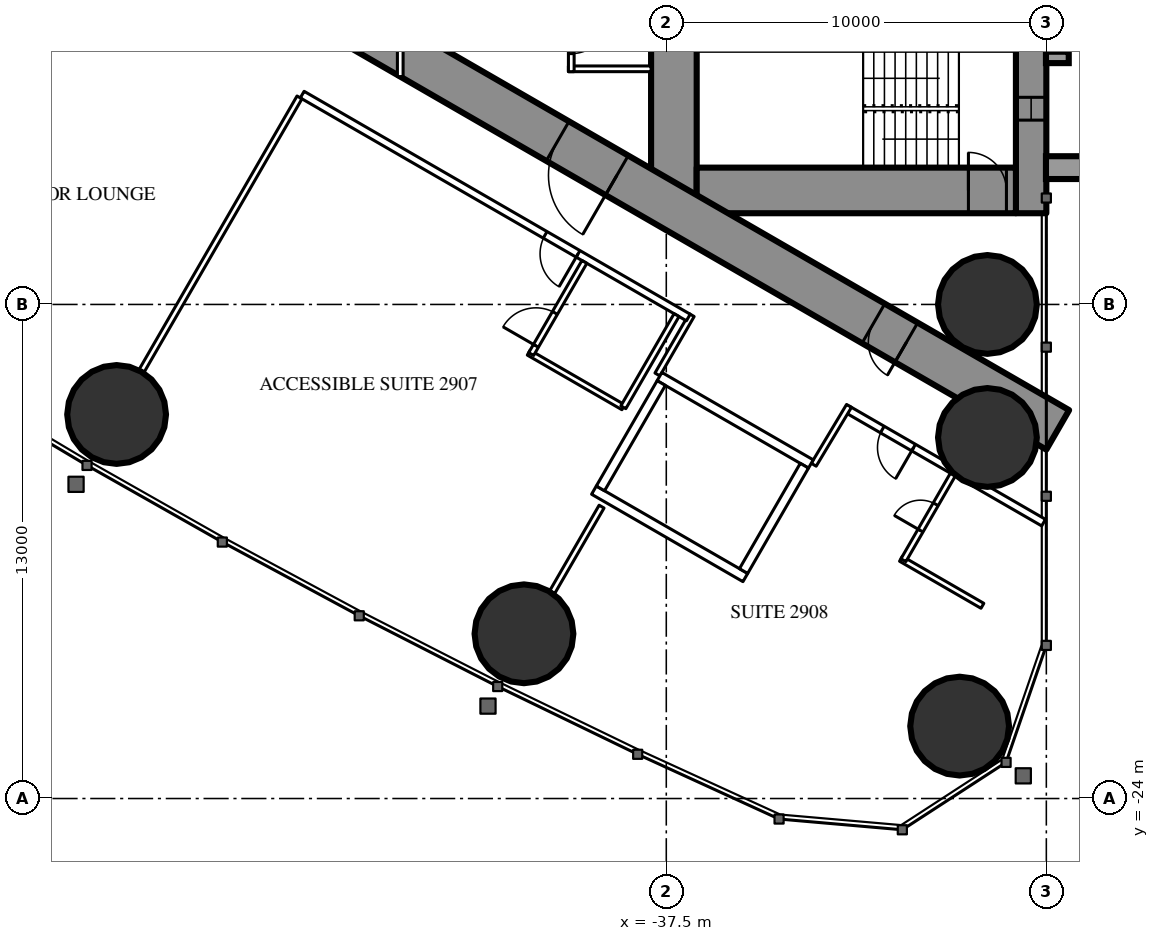
"""IFC4 building model, lengths in metres.
Left out: names, types, materials, properties, quantities, classifications, styles, units other than length and angle.
Written with IfcOpenShell. Run it as: python <this file> out.ifc"""

import sys

from ifc_helpers import new_model, si_unit, direction, frame, frame_2d, origin, origin_2d, place, context, subcontext, project, spatial, rectangle, hollow_circle, extrude, element, fill, save


model = new_model("IFC4")
c1 = context("Model", 3, precision=1e-05, world=origin(), true_north=direction((0.0, 1.0)))
c2 = subcontext(c1, "Body", "Model", "MODEL_VIEW")
j1 = project(units=[si_unit("LENGTHUNIT", "METRE"), si_unit("PLANEANGLEUNIT", "RADIAN")], contexts=[c1])
p1 = place(None, origin())
s1 = spatial("IfcSite", under=j1, at=p1, CompositionType="ELEMENT")
p2 = place(p1, origin())
s2 = spatial("IfcBuilding", under=s1, at=p2, CompositionType="ELEMENT")
p3 = place(p2, frame((0.0, 0.0, 111.6)))
s3 = spatial("IfcBuildingStorey", under=s2, at=p3, CompositionType="ELEMENT", Elevation=111.6)
for number, where, z_axis, x_axis in (
    (1, (-29.781, -22.095, 0.0), (0.0, 0.0, 1.0), (1.0, 0.0, 0.0)),
    (2, (-29.05, -11.0, 0.0), (0.0, 0.0, 1.0), (1.0, 0.0, 0.0)),
    (3, (-29.05, -14.5, 0.0), (0.0, 0.0, 1.0), (1.0, 0.0, 0.0)),
    (4, (-51.963, -13.895, 0.0), (0.0, 0.0, 1.0), (1.0, 0.0, 0.0)),
    (5, (-41.245, -19.666, 0.0), (0.0, 0.0, 1.0), (1.0, 0.0, 0.0)),
):
    element("IfcColumn", number, at=place(p3, frame(where, z_axis=z_axis, x_axis=x_axis)), inside=s3, PredefinedType="COLUMN", context=c2, shape_type="SweptSolid", body=[
        extrude(hollow_circle(Radius=1.3, WallThickness=0.1, at=origin_2d()), origin(), (0.0, 0.0, 1.0), 3.5),
    ])
p4 = place(p3, frame((-27.9, 8.6, 0.0), z_axis=(0.0, 0.0, 1.0), x_axis=(0.0, -1.0, 0.0)))
e6 = element("IfcWall", 6, at=p4, inside=s3, PredefinedType="SHEAR", context=c2, shape_type="SweptSolid", body=[
    extrude(rectangle(XDim=17.2, YDim=0.8, at=frame_2d((8.6, 0.0))), origin(), (0.0, 0.0, 1.0), 3.5),
])
p5 = place(p4, frame((2.45, 0.0, 0.6)))
e7 = element("IfcOpeningElement", 7, at=p5, cuts=e6, PredefinedType="OPENING", context=c2, shape_type="SweptSolid", body=[
    extrude(rectangle(XDim=0.6, YDim=2.1, at=frame_2d((0.3, 1.05))), frame((0.0, 0.41, 0.0), z_axis=(0.0, -1.0, 0.0), x_axis=(1.0, 0.0, 0.0)), (0.0, 0.0, 1.0), 0.82),
])
p6 = place(p4, frame((14.15, 0.0, 0.6)))
e8 = element("IfcOpeningElement", 8, at=p6, cuts=e6, PredefinedType="OPENING", context=c2, shape_type="SweptSolid", body=[
    extrude(rectangle(XDim=0.6, YDim=2.1, at=frame_2d((0.3, 1.05))), frame((0.0, 0.41, 0.0), z_axis=(0.0, -1.0, 0.0), x_axis=(1.0, 0.0, 0.0)), (0.0, 0.0, 1.0), 0.82),
])
p7 = place(p3, frame((-37.3, 8.6, 0.0), z_axis=(0.0, 0.0, 1.0), x_axis=(0.0, -1.0, 0.0)))
e9 = element("IfcWall", 9, at=p7, inside=s3, PredefinedType="SHEAR", context=c2, shape_type="SweptSolid", body=[
    extrude(rectangle(XDim=17.2, YDim=1.2, at=frame_2d((8.6, 0.0))), origin(), (0.0, 0.0, 1.0), 3.5),
])
p8 = place(p7, frame((7.7, 0.0, 0.0)))
e10 = element("IfcOpeningElement", 10, at=p8, cuts=e9, PredefinedType="OPENING", context=c2, shape_type="SweptSolid", body=[
    extrude(rectangle(XDim=1.8, YDim=2.2, at=frame_2d((0.9, 1.1))), frame((0.0, 0.61, 0.0), z_axis=(0.0, -1.0, 0.0), x_axis=(1.0, 0.0, 0.0)), (0.0, 0.0, 1.0), 1.22),
])
p9 = place(p3, frame((-28.3, -8.0, 0.0), z_axis=(0.0, 0.0, 1.0), x_axis=(-1.0, 0.0, 0.0)))
e11 = element("IfcWall", 11, at=p9, inside=s3, PredefinedType="SHEAR", context=c2, shape_type="SweptSolid", body=[
    extrude(rectangle(XDim=8.4, YDim=1.2, at=frame_2d((4.2, 0.0))), origin(), (0.0, 0.0, 1.0), 3.5),
])
p10 = place(p9, frame((0.25, 0.0, 0.0)))
e12 = element("IfcOpeningElement", 12, at=p10, cuts=e11, PredefinedType="OPENING", context=c2, shape_type="SweptSolid", body=[
    extrude(rectangle(XDim=1.0, YDim=2.2, at=frame_2d((0.5, 1.1))), frame((0.0, 0.61, 0.0), z_axis=(0.0, -1.0, 0.0), x_axis=(1.0, 0.0, 0.0)), (0.0, 0.0, 1.0), 1.22),
])
p11 = place(p3, frame((-27.2, -14.3, 0.0), z_axis=(0.0, 0.0, 1.0), x_axis=(-0.866024021859, 0.500002393557, 0.0)))
e13 = element("IfcWall", 13, at=p11, inside=s3, PredefinedType="SHEAR", context=c2, shape_type="SweptSolid", body=[
    extrude(rectangle(XDim=27.907, YDim=1.2, at=frame_2d((13.954, 0.0))), origin(), (0.0, 0.0, 1.0), 3.5),
])
p12 = place(p11, frame((4.6, 0.0, 0.0)))
e14 = element("IfcOpeningElement", 14, at=p12, cuts=e13, PredefinedType="OPENING", context=c2, shape_type="SweptSolid", body=[
    extrude(rectangle(XDim=1.0, YDim=2.2, at=frame_2d((0.5, 1.1))), frame((0.0, 0.61, 0.0), z_axis=(0.0, -1.0, 0.0), x_axis=(1.0, 0.0, 0.0)), (0.0, 0.0, 1.0), 1.22),
])
p13 = place(p11, frame((13.395, 0.0, 0.0)))
e15 = element("IfcOpeningElement", 15, at=p13, cuts=e13, PredefinedType="OPENING", context=c2, shape_type="SweptSolid", body=[
    extrude(rectangle(XDim=1.8, YDim=2.2, at=frame_2d((0.9, 1.1))), frame((0.0, 0.61, 0.0), z_axis=(0.0, -1.0, 0.0), x_axis=(1.0, 0.0, 0.0)), (0.0, 0.0, 1.0), 1.22),
])
p14 = place(p3, frame((-47.151, -5.552, 0.0), z_axis=(0.0, 0.0, 1.0), x_axis=(-0.500003012045, -0.866023664773, 0.0)))
e16 = element("IfcWall", 16, at=p14, inside=s3, PredefinedType="PARTITIONING", context=c2, shape_type="SweptSolid", body=[
    extrude(rectangle(XDim=8.311, YDim=0.15, at=frame_2d((4.156, 0.0))), origin(), (0.0, 0.0, 1.0), 2.2),
])
p15 = place(p3, frame((-39.202, -16.32, 0.0), z_axis=(0.0, 0.0, 1.0), x_axis=(-0.49997716683, -0.86603858612, 0.0)))
e17 = element("IfcWall", 17, at=p15, inside=s3, PredefinedType="PARTITIONING", context=c2, shape_type="SweptSolid", body=[
    extrude(rectangle(XDim=2.6, YDim=0.15, at=frame_2d((1.3, 0.0))), origin(), (0.0, 0.0, 1.0), 3.25),
])
p16 = place(p3, frame((-27.572, -16.741, 0.0), z_axis=(0.0, 0.0, 1.0), x_axis=(-0.866024464444, 0.500001626982, 0.0)))
e18 = element("IfcWall", 18, at=p16, inside=s3, PredefinedType="PARTITIONING", context=c2, shape_type="SweptSolid", body=[
    extrude(rectangle(XDim=5.955, YDim=0.2, at=frame_2d((2.978, 0.0))), origin(), (0.0, 0.0, 1.0), 3.25),
])
p17 = place(p16, frame((3.95, 0.0, 0.0)))
e19 = element("IfcOpeningElement", 19, at=p17, cuts=e18, PredefinedType="OPENING", context=c2, shape_type="SweptSolid", body=[
    extrude(rectangle(XDim=0.95, YDim=2.2, at=frame_2d((0.475, 1.1))), frame((0.0, 0.11, 0.0), z_axis=(0.0, -1.0, 0.0), x_axis=(1.0, 0.0, 0.0)), (0.0, 0.0, 1.0), 0.22),
])
p18 = place(p3, frame((-36.831, -11.28, 0.0), z_axis=(0.0, 0.0, 1.0), x_axis=(-0.499937177781, -0.866061671171, 0.0)))
e20 = element("IfcWall", 20, at=p18, inside=s3, PredefinedType="PARTITIONING", context=c2, shape_type="SweptSolid", body=[
    extrude(rectangle(XDim=1.804, YDim=0.15, at=frame_2d((0.902, 0.0))), origin(), (0.0, 0.0, 1.0), 3.25),
])
p19 = place(p3, frame((-33.621, -15.218, 0.0), z_axis=(0.0, 0.0, 1.0), x_axis=(0.514336634837, 0.857588377991, 0.0)))
e21 = element("IfcWall", 21, at=p19, inside=s3, PredefinedType="PARTITIONING", context=c2, shape_type="SweptSolid", body=[
    extrude(rectangle(XDim=1.805, YDim=0.15, at=frame_2d((0.903, 0.0))), origin(), (0.0, 0.0, 1.0), 3.25),
])
p20 = place(p3, frame((-36.92, -11.344, 0.0), z_axis=(0.0, 0.0, 1.0), x_axis=(-0.866027897759, 0.499995680284, 0.0)))
e22 = element("IfcWall", 22, at=p20, inside=s3, PredefinedType="PARTITIONING", context=c2, shape_type="SweptSolid", body=[
    extrude(rectangle(XDim=11.731, YDim=0.2, at=frame_2d((5.865, 0.0))), origin(), (0.0, 0.0, 1.0), 3.25),
])
p21 = place(p20, frame((3.35, 0.0, 0.0)))
e23 = element("IfcOpeningElement", 23, at=p21, cuts=e22, PredefinedType="OPENING", context=c2, shape_type="SweptSolid", body=[
    extrude(rectangle(XDim=1.0, YDim=2.2, at=frame_2d((0.5, 1.1))), frame((0.0, 0.11, 0.0), z_axis=(0.0, -1.0, 0.0), x_axis=(1.0, 0.0, 0.0)), (0.0, 0.0, 1.0), 0.22),
])
p22 = place(p3, frame((-38.63, -13.705, 0.0), z_axis=(0.0, 0.0, 1.0), x_axis=(-0.866018712932, 0.500011588718, 0.0)))
e24 = element("IfcWall", 24, at=p22, inside=s3, PredefinedType="PARTITIONING", context=c2, shape_type="SweptSolid", body=[
    extrude(rectangle(XDim=2.875, YDim=0.15, at=frame_2d((1.438, 0.0))), origin(), (0.0, 0.0, 1.0), 3.25),
])
p23 = place(p3, frame((-39.655, -9.88, 0.0), z_axis=(0.0, 0.0, 1.0), x_axis=(-0.500049511043, -0.865996816683, 0.0)))
e25 = element("IfcWall", 25, at=p23, inside=s3, PredefinedType="PARTITIONING", context=c2, shape_type="SweptSolid", body=[
    extrude(rectangle(XDim=2.8, YDim=0.15, at=frame_2d((1.4, 0.0))), origin(), (0.0, 0.0, 1.0), 3.25),
])
p24 = place(p23, frame((1.55, 0.0, 0.0)))
e26 = element("IfcOpeningElement", 26, at=p24, cuts=e25, PredefinedType="OPENING", context=c2, shape_type="SweptSolid", body=[
    extrude(rectangle(XDim=1.0, YDim=2.2, at=frame_2d((0.5, 1.1))), frame((0.0, 0.085, 0.0), z_axis=(0.0, -1.0, 0.0), x_axis=(1.0, 0.0, 0.0)), (0.0, 0.0, 1.0), 0.17),
])
p25 = place(p3, frame((-37.23, -11.281, 0.0), z_axis=(0.0, 0.0, 1.0), x_axis=(-0.500049511043, -0.865996816683, 0.0)))
e27 = element("IfcWall", 27, at=p25, inside=s3, PredefinedType="PARTITIONING", context=c2, shape_type="SweptSolid", body=[
    extrude(rectangle(XDim=2.8, YDim=0.15, at=frame_2d((1.4, 0.0))), origin(), (0.0, 0.0, 1.0), 3.25),
])
p26 = place(p3, frame((-29.182, -18.929, 0.0), z_axis=(0.0, 0.0, 1.0), x_axis=(-0.866006523861, 0.500032699561, 0.0)))
e28 = element("IfcWall", 28, at=p26, inside=s3, PredefinedType="PARTITIONING", context=c2, shape_type="SweptSolid", body=[
    extrude(rectangle(XDim=2.475, YDim=0.15, at=frame_2d((1.237, 0.0))), origin(), (0.0, 0.0, 1.0), 3.25),
])
p27 = place(p3, frame((-29.96, -15.478, 0.0), z_axis=(0.0, 0.0, 1.0), x_axis=(-0.500006934395, -0.866021400173, 0.0)))
e29 = element("IfcWall", 29, at=p27, inside=s3, PredefinedType="PARTITIONING", context=c2, shape_type="SweptSolid", body=[
    extrude(rectangle(XDim=2.6, YDim=0.15, at=frame_2d((1.3, 0.0))), origin(), (0.0, 0.0, 1.0), 3.25),
])
p28 = place(p27, frame((0.9, 0.0, 0.0)))
e30 = element("IfcOpeningElement", 30, at=p28, cuts=e29, PredefinedType="OPENING", context=c2, shape_type="SweptSolid", body=[
    extrude(rectangle(XDim=0.8, YDim=2.2, at=frame_2d((0.4, 1.1))), frame((0.0, 0.085, 0.0), z_axis=(0.0, -1.0, 0.0), x_axis=(1.0, 0.0, 0.0)), (0.0, 0.0, 1.0), 0.17),
])
p29 = place(p3, frame((-37.9, -4.8, 0.0), z_axis=(0.0, 0.0, 1.0), x_axis=(-1.0, 0.0, 0.0)))
e31 = element("IfcWall", 31, at=p29, inside=s3, PredefinedType="PARTITIONING", context=c2, shape_type="SweptSolid", body=[
    extrude(rectangle(XDim=2.175, YDim=0.15, at=frame_2d((1.087, 0.0))), origin(), (0.0, 0.0, 1.0), 3.25),
])
p30 = place(p3, frame((-40.0, -2.925, 0.0), z_axis=(0.0, 0.0, 1.0), x_axis=(0.0, -1.0, 0.0)))
e32 = element("IfcWall", 32, at=p30, inside=s3, PredefinedType="PARTITIONING", context=c2, shape_type="SweptSolid", body=[
    extrude(rectangle(XDim=1.95, YDim=0.15, at=frame_2d((0.975, 0.0))), origin(), (0.0, 0.0, 1.0), 3.25),
])
p31 = place(p30, frame((0.475, 0.0, 0.0)))
e33 = element("IfcOpeningElement", 33, at=p31, cuts=e32, PredefinedType="OPENING", context=c2, shape_type="SweptSolid", body=[
    extrude(rectangle(XDim=1.0, YDim=2.2, at=frame_2d((0.5, 1.1))), frame((0.0, 0.085, 0.0), z_axis=(0.0, -1.0, 0.0), x_axis=(1.0, 0.0, 0.0)), (0.0, 0.0, 1.0), 0.17),
])
p32 = place(p3, frame((-44.5, 5.005, 0.0), z_axis=(0.0, 0.0, 1.0), x_axis=(0.0, -1.0, 0.0)))
e34 = element("IfcWall", 34, at=p32, inside=s3, PredefinedType="PARTITIONING", context=c2, shape_type="SweptSolid", body=[
    extrude(rectangle(XDim=10.009, YDim=0.15, at=frame_2d((5.005, 0.0))), origin(), (0.0, 0.0, 1.0), 2.45),
])
p33 = place(p32, frame((2.002, 0.0, 0.0)))
e35 = element("IfcOpeningElement", 35, at=p33, cuts=e34, PredefinedType="OPENING", context=c2, shape_type="SweptSolid", body=[
    extrude(rectangle(XDim=1.0, YDim=2.2, at=frame_2d((0.5, 1.1))), frame((0.0, 0.085, 0.0), z_axis=(0.0, -1.0, 0.0), x_axis=(1.0, 0.0, 0.0)), (0.0, 0.0, 1.0), 0.17),
])
p34 = place(p32, frame((7.007, 0.0, 0.0)))
e36 = element("IfcOpeningElement", 36, at=p34, cuts=e34, PredefinedType="OPENING", context=c2, shape_type="SweptSolid", body=[
    extrude(rectangle(XDim=1.0, YDim=2.2, at=frame_2d((0.5, 1.1))), frame((0.0, 0.085, 0.0), z_axis=(0.0, -1.0, 0.0), x_axis=(1.0, 0.0, 0.0)), (0.0, 0.0, 1.0), 0.17),
])
p35 = place(p3, frame((-33.696, -15.197, 0.0), z_axis=(0.0, 0.0, 1.0), x_axis=(-0.865976953817, 0.500083908417, 0.0)))
e37 = element("IfcWall", 37, at=p35, inside=s3, PredefinedType="PARTITIONING", context=c2, shape_type="SweptSolid", body=[
    extrude(rectangle(XDim=4.599, YDim=0.25, at=frame_2d((2.3, 0.0))), origin(), (0.0, 0.0, 1.0), 3.25),
])
p36 = place(p3, frame((-35.42, -18.186, 0.0), z_axis=(0.0, 0.0, 1.0), x_axis=(-0.865990227814, 0.50006092162, 0.0)))
e38 = element("IfcWall", 38, at=p36, inside=s3, PredefinedType="PARTITIONING", context=c2, shape_type="SweptSolid", body=[
    extrude(rectangle(XDim=4.6, YDim=0.25, at=frame_2d((2.3, 0.0))), origin(), (0.0, 0.0, 1.0), 3.25),
])
p37 = place(p3, frame((-33.866, -15.243, 0.0), z_axis=(0.0, 0.0, 1.0), x_axis=(-0.499929347863, -0.866066190972, 0.0)))
e39 = element("IfcWall", 39, at=p37, inside=s3, PredefinedType="PARTITIONING", context=c2, shape_type="SweptSolid", body=[
    extrude(rectangle(XDim=3.201, YDim=0.25, at=frame_2d((1.6, 0.0))), origin(), (0.0, 0.0, 1.0), 3.25),
])
p38 = place(p3, frame((-37.633, -13.068, 0.0), z_axis=(0.0, 0.0, 1.0), x_axis=(-0.499872130319, -0.866099216793, 0.0)))
e40 = element("IfcWall", 40, at=p38, inside=s3, PredefinedType="PARTITIONING", context=c2, shape_type="SweptSolid", body=[
    extrude(rectangle(XDim=3.2, YDim=0.25, at=frame_2d((1.6, 0.0))), origin(), (0.0, 0.0, 1.0), 3.25),
])
p39 = place(p24, origin())
e41 = element("IfcDoor", 41, at=p39, inside=s3, OperationType="SINGLE_SWING_RIGHT", PredefinedType="DOOR", context=c2, shape_type="SweptSolid", body=[
    extrude(rectangle(XDim=1.0, YDim=2.2, at=frame_2d((0.5, 1.1))), frame((0.0, 0.025, 0.0), z_axis=(0.0, -1.0, 0.0), x_axis=(1.0, 0.0, 0.0)), (0.0, 0.0, 1.0), 0.05),
])
fill(e26, e41)
p40 = place(p21, origin())
e42 = element("IfcDoor", 42, at=p40, inside=s3, OperationType="SINGLE_SWING_LEFT", PredefinedType="DOOR", context=c2, shape_type="SweptSolid", body=[
    extrude(rectangle(XDim=1.0, YDim=2.2, at=frame_2d((0.5, 1.1))), frame((0.0, 0.025, 0.0), z_axis=(0.0, -1.0, 0.0), x_axis=(1.0, 0.0, 0.0)), (0.0, 0.0, 1.0), 0.05),
])
fill(e23, e42)
p41 = place(p28, origin())
e43 = element("IfcDoor", 43, at=p41, inside=s3, OperationType="SINGLE_SWING_RIGHT", PredefinedType="DOOR", context=c2, shape_type="SweptSolid", body=[
    extrude(rectangle(XDim=0.8, YDim=2.2, at=frame_2d((0.4, 1.1))), frame((0.0, 0.025, 0.0), z_axis=(0.0, -1.0, 0.0), x_axis=(1.0, 0.0, 0.0)), (0.0, 0.0, 1.0), 0.05),
])
fill(e30, e43)
p42 = place(p17, origin())
e44 = element("IfcDoor", 44, at=p42, inside=s3, OperationType="SINGLE_SWING_LEFT", PredefinedType="DOOR", context=c2, shape_type="SweptSolid", body=[
    extrude(rectangle(XDim=0.95, YDim=2.2, at=frame_2d((0.475, 1.1))), frame((0.0, 0.025, 0.0), z_axis=(0.0, -1.0, 0.0), x_axis=(1.0, 0.0, 0.0)), (0.0, 0.0, 1.0), 0.05),
])
fill(e19, e44)
p43 = place(p31, origin())
e45 = element("IfcDoor", 45, at=p43, inside=s3, OperationType="SINGLE_SWING_LEFT", PredefinedType="DOOR", context=c2, shape_type="SweptSolid", body=[
    extrude(rectangle(XDim=1.0, YDim=2.2, at=frame_2d((0.5, 1.1))), frame((0.0, 0.025, 0.0), z_axis=(0.0, -1.0, 0.0), x_axis=(1.0, 0.0, 0.0)), (0.0, 0.0, 1.0), 0.05),
])
fill(e33, e45)
p44 = place(p12, origin())
e46 = element("IfcDoor", 46, at=p44, inside=s3, OperationType="SINGLE_SWING_LEFT", PredefinedType="DOOR", context=c2, shape_type="SweptSolid", body=[
    extrude(rectangle(XDim=1.0, YDim=2.2, at=frame_2d((0.5, 1.1))), frame((0.0, 0.025, 0.0), z_axis=(0.0, -1.0, 0.0), x_axis=(1.0, 0.0, 0.0)), (0.0, 0.0, 1.0), 0.05),
])
fill(e14, e46)
p45 = place(p13, origin())
e47 = element("IfcDoor", 47, at=p45, inside=s3, OperationType="DOUBLE_DOOR_SINGLE_SWING", PredefinedType="DOOR", context=c2, shape_type="SweptSolid", body=[
    extrude(rectangle(XDim=1.8, YDim=2.2, at=frame_2d((0.9, 1.1))), frame((0.0, 0.025, 0.0), z_axis=(0.0, -1.0, 0.0), x_axis=(1.0, 0.0, 0.0)), (0.0, 0.0, 1.0), 0.05),
])
fill(e15, e47)
p46 = place(p10, origin())
e48 = element("IfcDoor", 48, at=p46, inside=s3, OperationType="SINGLE_SWING_RIGHT", PredefinedType="DOOR", context=c2, shape_type="SweptSolid", body=[
    extrude(rectangle(XDim=1.0, YDim=2.2, at=frame_2d((0.5, 1.1))), frame((0.0, 0.025, 0.0), z_axis=(0.0, -1.0, 0.0), x_axis=(1.0, 0.0, 0.0)), (0.0, 0.0, 1.0), 0.05),
])
fill(e12, e48)
p47 = place(p6, origin())
e49 = element("IfcWindow", 49, at=p47, inside=s3, PartitioningType="SINGLE_PANEL", PredefinedType="WINDOW", context=c2, shape_type="SweptSolid", body=[
    extrude(rectangle(XDim=0.6, YDim=2.1, at=frame_2d((0.3, 1.05))), frame((0.0, 0.03, 0.0), z_axis=(0.0, -1.0, 0.0), x_axis=(1.0, 0.0, 0.0)), (0.0, 0.0, 1.0), 0.06),
])
fill(e8, e49)
save(model, sys.argv[1])
